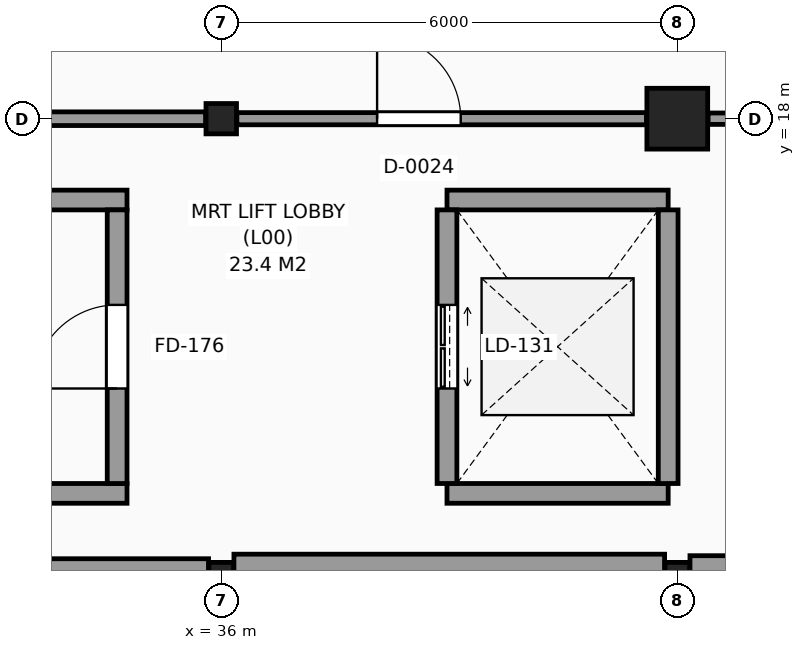
"""IFC4 building model, lengths in metres.
Left out: names, types, materials, properties, quantities, classifications, styles, units other than length and angle.
Written with IfcOpenShell. Run it as: python <this file> out.ifc"""

import sys

from ifc_helpers import new_model, si_unit, direction, frame, frame_2d, origin, origin_2d, place, context, subcontext, project, spatial, rectangle, hollow_circle, i_section, extrude, element, fill, save


model = new_model("IFC4")
c1 = context("Model", 3, precision=1e-05, world=origin(), true_north=direction((0.0, 1.0)))
c2 = subcontext(c1, "Body", "Model", "MODEL_VIEW")
j1 = project(units=[si_unit("LENGTHUNIT", "METRE"), si_unit("PLANEANGLEUNIT", "RADIAN")], contexts=[c1])
p1 = place(None, origin())
s1 = spatial("IfcSite", under=j1, at=p1, CompositionType="ELEMENT")
p2 = place(p1, origin())
s2 = spatial("IfcBuilding", under=s1, at=p2, CompositionType="ELEMENT")
p3 = place(p2, origin())
s3 = spatial("IfcBuildingStorey", under=s2, at=p3, CompositionType="ELEMENT", Elevation=0.0)
p4 = place(p3, frame((36.0, 12.0, 0.0), z_axis=(0.0, 0.0, 1.0), x_axis=(1.0, 0.0, 0.0)))
e1 = element("IfcColumn", 1, at=p4, inside=s3, PredefinedType="COLUMN", context=c2, shape_type="SweptSolid", body=[
    extrude(hollow_circle(Radius=0.162, WallThickness=0.016, at=origin_2d()), origin(), (0.0, 0.0, 1.0), 6.0),
])
p5 = place(p3, frame((36.0, 18.0, 0.0), z_axis=(0.0, 0.0, 1.0), x_axis=(1.0, 0.0, 0.0)))
e2 = element("IfcColumn", 2, at=p5, inside=s3, PredefinedType="COLUMN", context=c2, shape_type="SweptSolid", body=[
    extrude(i_section(OverallWidth=0.401, OverallDepth=0.399, WebThickness=0.019, FlangeThickness=0.03, FilletRadius=0.015, at=origin_2d()), origin(), (0.0, 0.0, 1.0), 6.0),
])
p6 = place(p3, frame((42.0, 12.0, 0.0), z_axis=(0.0, 0.0, 1.0), x_axis=(1.0, 0.0, 0.0)))
e3 = element("IfcColumn", 3, at=p6, inside=s3, PredefinedType="COLUMN", context=c2, shape_type="SweptSolid", body=[
    extrude(hollow_circle(Radius=0.162, WallThickness=0.016, at=origin_2d()), origin(), (0.0, 0.0, 1.0), 6.0),
])
p7 = place(p3, frame((42.0, 18.0, 0.0), z_axis=(0.0, 0.0, 1.0), x_axis=(1.0, 0.0, 0.0)))
e4 = element("IfcColumn", 4, at=p7, inside=s3, PredefinedType="COLUMN", context=c2, shape_type="SweptSolid", body=[
    extrude(rectangle(XDim=0.8, YDim=0.8, at=origin_2d()), origin(), (0.0, 0.0, 1.0), 6.0),
])
p8 = place(p3, frame((30.167, 12.105, 0.0), z_axis=(0.0, 0.0, 1.0), x_axis=(1.0, 0.0, 0.0)))
e5 = element("IfcWall", 5, at=p8, inside=s3, PredefinedType="SOLIDWALL", context=c2, shape_type="SweptSolid", body=[
    extrude(rectangle(XDim=5.666, YDim=0.21, at=frame_2d((2.833, 0.0))), origin(), (0.0, 0.0, 1.0), 5.74),
])
p9 = place(p3, frame((36.167, 12.135, 0.0), z_axis=(0.0, 0.0, 1.0), x_axis=(1.0, 0.0, 0.0)))
e6 = element("IfcWall", 6, at=p9, inside=s3, PredefinedType="SOLIDWALL", context=c2, shape_type="SweptSolid", body=[
    extrude(rectangle(XDim=5.666, YDim=0.27, at=frame_2d((2.833, 0.0))), origin(), (0.0, 0.0, 1.0), 5.74),
])
p10 = place(p3, frame((42.167, 12.125, 0.0), z_axis=(0.0, 0.0, 1.0), x_axis=(1.0, 0.0, 0.0)))
e7 = element("IfcWall", 7, at=p10, inside=s3, PredefinedType="SOLIDWALL", context=c2, shape_type="SweptSolid", body=[
    extrude(rectangle(XDim=5.666, YDim=0.25, at=frame_2d((2.833, 0.0))), origin(), (0.0, 0.0, 1.0), 5.74),
])
for number, where, z_axis, x_axis in (
    (8, (24.04, 13.07, 0.0), (0.0, 0.0, 1.0), (1.0, 0.0, 0.0)),
    (9, (24.04, 16.93, 0.0), (0.0, 0.0, 1.0), (1.0, 0.0, 0.0)),
):
    element("IfcWall", number, at=place(p3, frame(where, z_axis=z_axis, x_axis=x_axis)), inside=s3, PredefinedType="SHEAR", context=c2, shape_type="SweptSolid", body=[
        extrude(rectangle(XDim=10.72, YDim=0.26, at=frame_2d((5.36, 0.0))), origin(), (0.0, 0.0, 1.0), 6.0),
    ])
p11 = place(p3, frame((34.63, 13.2, 0.0), z_axis=(0.0, 0.0, 1.0), x_axis=(0.0, 1.0, 0.0)))
e10 = element("IfcWall", 10, at=p11, inside=s3, PredefinedType="SHEAR", context=c2, shape_type="SweptSolid", body=[
    extrude(rectangle(XDim=3.6, YDim=0.26, at=frame_2d((1.8, 0.0))), origin(), (0.0, 0.0, 1.0), 6.0),
])
p12 = place(p11, frame((1.25, 0.0, 0.0)))
e11 = element("IfcOpeningElement", 11, at=p12, cuts=e10, PredefinedType="OPENING", context=c2, shape_type="SweptSolid", body=[
    extrude(rectangle(XDim=1.1, YDim=2.15, at=frame_2d((0.55, 1.075))), frame((0.0, 0.14, 0.0), z_axis=(0.0, -1.0, 0.0), x_axis=(1.0, 0.0, 0.0)), (0.0, 0.0, 1.0), 0.28),
])
for number, where, z_axis, x_axis in (
    (12, (38.97, 13.07, 0.0), (0.0, 0.0, 1.0), (1.0, 0.0, 0.0)),
    (13, (38.97, 16.93, 0.0), (0.0, 0.0, 1.0), (1.0, 0.0, 0.0)),
):
    element("IfcWall", number, at=place(p3, frame(where, z_axis=z_axis, x_axis=x_axis)), inside=s3, PredefinedType="SHEAR", context=c2, shape_type="SweptSolid", body=[
        extrude(rectangle(XDim=2.91, YDim=0.26, at=frame_2d((1.455, 0.0))), origin(), (0.0, 0.0, 1.0), 6.0),
    ])
p13 = place(p3, frame((41.88, 13.2, 0.0), z_axis=(0.0, 0.0, 1.0), x_axis=(0.0, 1.0, 0.0)))
e14 = element("IfcWall", 14, at=p13, inside=s3, PredefinedType="SHEAR", context=c2, shape_type="SweptSolid", body=[
    extrude(rectangle(XDim=3.6, YDim=0.26, at=frame_2d((1.8, 0.0))), origin(), (0.0, 0.0, 1.0), 6.0),
])
p14 = place(p3, frame((38.97, 13.2, 0.0), z_axis=(0.0, 0.0, 1.0), x_axis=(0.0, 1.0, 0.0)))
e15 = element("IfcWall", 15, at=p14, inside=s3, PredefinedType="SHEAR", context=c2, shape_type="SweptSolid", body=[
    extrude(rectangle(XDim=3.6, YDim=0.26, at=frame_2d((1.8, 0.0))), origin(), (0.0, 0.0, 1.0), 6.0),
])
p15 = place(p14, frame((1.25, 0.0, 0.0)))
e16 = element("IfcOpeningElement", 16, at=p15, cuts=e15, PredefinedType="OPENING", context=c2, shape_type="SweptSolid", body=[
    extrude(rectangle(XDim=1.1, YDim=2.2, at=frame_2d((0.55, 1.1))), frame((0.0, 0.14, 0.0), z_axis=(0.0, -1.0, 0.0), x_axis=(1.0, 0.0, 0.0)), (0.0, 0.0, 1.0), 0.28),
])
p16 = place(p3, frame((30.505, 18.0, 0.0), z_axis=(0.0, 0.0, 1.0), x_axis=(1.0, 0.0, 0.0)))
e17 = element("IfcWall", 17, at=p16, inside=s3, PredefinedType="PARTITIONING", context=c2, shape_type="SweptSolid", body=[
    extrude(rectangle(XDim=5.29, YDim=0.18, at=frame_2d((2.645, 0.0))), origin(), (0.0, 0.0, 1.0), 5.74),
])
p17 = place(p3, frame((36.206, 18.0, 0.0), z_axis=(0.0, 0.0, 1.0), x_axis=(1.0, 0.0, 0.0)))
e18 = element("IfcWall", 18, at=p17, inside=s3, PredefinedType="PARTITIONING", context=c2, shape_type="SweptSolid", body=[
    extrude(rectangle(XDim=5.389, YDim=0.16, at=frame_2d((2.695, 0.0))), origin(), (0.0, 0.0, 1.0), 5.74),
])
p18 = place(p17, frame((1.845, 0.0, 0.0)))
e19 = element("IfcOpeningElement", 19, at=p18, cuts=e18, PredefinedType="OPENING", context=c2, shape_type="SweptSolid", body=[
    extrude(rectangle(XDim=1.1, YDim=2.15, at=frame_2d((0.55, 1.075))), frame((0.0, 0.09, 0.0), z_axis=(0.0, -1.0, 0.0), x_axis=(1.0, 0.0, 0.0)), (0.0, 0.0, 1.0), 0.18),
])
p19 = place(p3, frame((42.405, 18.0, 0.0), z_axis=(0.0, 0.0, 1.0), x_axis=(1.0, 0.0, 0.0)))
e20 = element("IfcWall", 20, at=p19, inside=s3, PredefinedType="PARTITIONING", context=c2, shape_type="SweptSolid", body=[
    extrude(rectangle(XDim=5.215, YDim=0.15, at=frame_2d((2.607, 0.0))), origin(), (0.0, 0.0, 1.0), 5.74),
])
p20 = place(p12, origin())
e21 = element("IfcDoor", 21, at=p20, inside=s3, OperationType="SINGLE_SWING_LEFT", PredefinedType="DOOR", context=c2, shape_type="SweptSolid", body=[
    extrude(rectangle(XDim=1.1, YDim=2.15, at=frame_2d((0.55, 1.075))), frame((0.0, 0.025, 0.0), z_axis=(0.0, -1.0, 0.0), x_axis=(1.0, 0.0, 0.0)), (0.0, 0.0, 1.0), 0.05),
])
fill(e11, e21)
p21 = place(p15, origin())
e22 = element("IfcDoor", 22, at=p21, inside=s3, OperationType="DOUBLE_DOOR_SLIDING", PredefinedType="DOOR", context=c2, shape_type="SweptSolid", body=[
    extrude(rectangle(XDim=1.1, YDim=2.2, at=frame_2d((0.55, 1.1))), frame((0.0, 0.025, 0.0), z_axis=(0.0, -1.0, 0.0), x_axis=(1.0, 0.0, 0.0)), (0.0, 0.0, 1.0), 0.05),
])
fill(e16, e22)
p22 = place(p18, origin())
e23 = element("IfcDoor", 23, at=p22, inside=s3, OperationType="SINGLE_SWING_LEFT", PredefinedType="DOOR", context=c2, shape_type="SweptSolid", body=[
    extrude(rectangle(XDim=1.1, YDim=2.15, at=frame_2d((0.55, 1.075))), frame((0.0, 0.025, 0.0), z_axis=(0.0, -1.0, 0.0), x_axis=(1.0, 0.0, 0.0)), (0.0, 0.0, 1.0), 0.05),
])
fill(e19, e23)
save(model, sys.argv[1])
